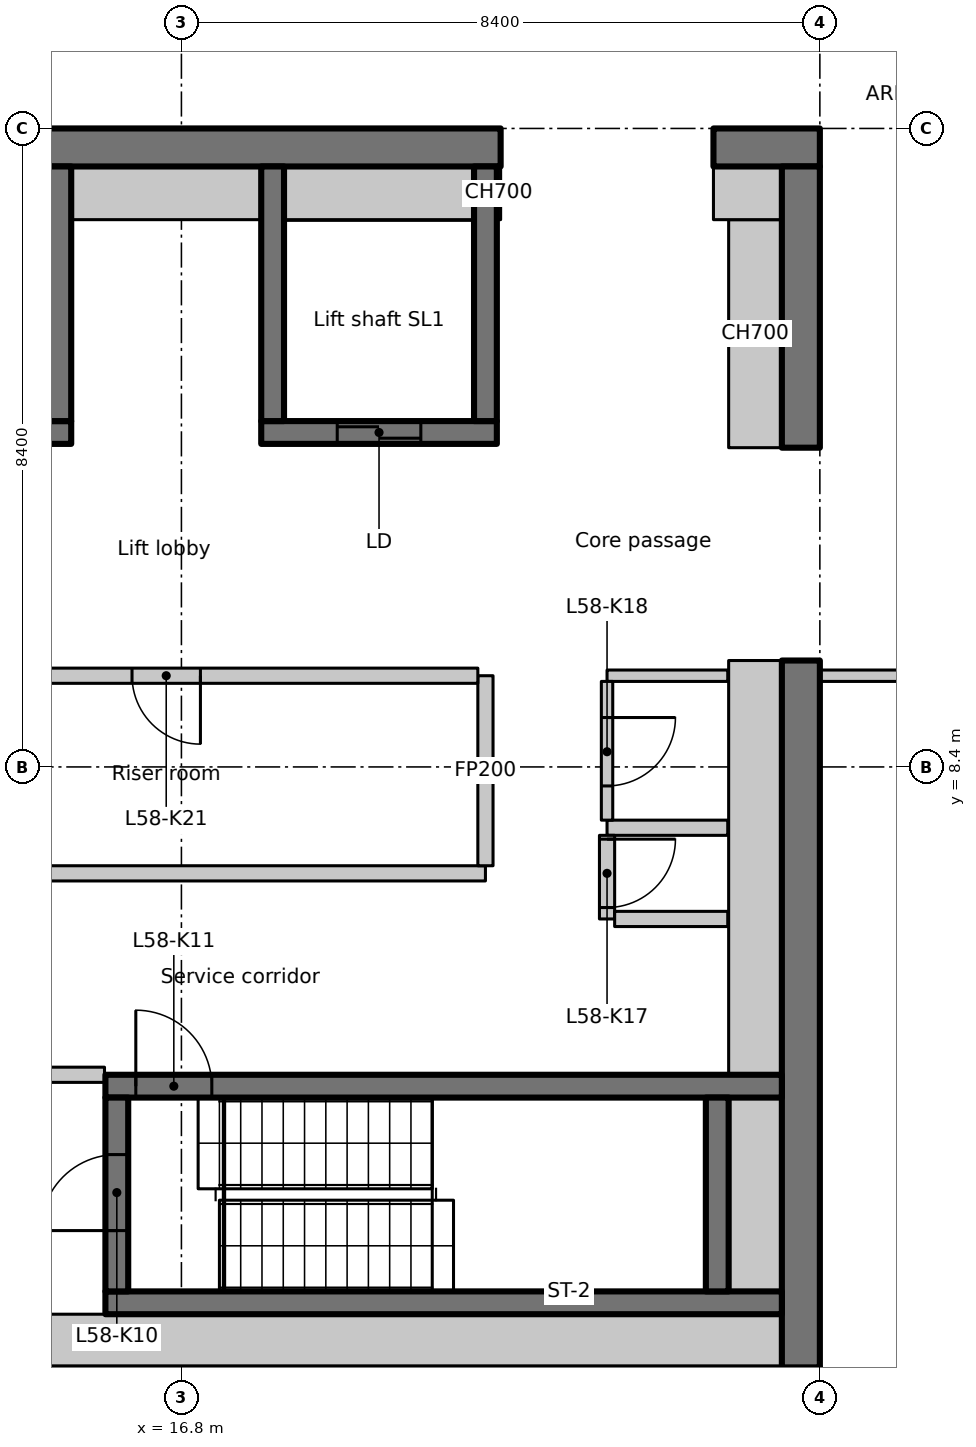
"""IFC4 building model, lengths in metres.
Left out: names, types, materials, properties, quantities, classifications, styles, units other than length and angle.
Written with IfcOpenShell. Run it as: python <this file> out.ifc"""

import sys

from ifc_helpers import new_model, si_unit, direction, frame, frame_2d, origin, place, context, subcontext, project, spatial, rectangle, extrude, element, fill, save


model = new_model("IFC4")
c1 = context("Model", 3, precision=1e-05, world=origin(), true_north=direction((0.0, 1.0)))
c2 = subcontext(c1, "Body", "Model", "MODEL_VIEW")
j1 = project(units=[si_unit("LENGTHUNIT", "METRE"), si_unit("PLANEANGLEUNIT", "RADIAN")], contexts=[c1])
p1 = place(None, origin())
s1 = spatial("IfcSite", under=j1, at=p1, CompositionType="ELEMENT")
p2 = place(p1, origin())
s2 = spatial("IfcBuilding", under=s1, at=p2, CompositionType="ELEMENT")
p3 = place(p2, frame((0.0, 0.0, 230.1)))
s3 = spatial("IfcBuildingStorey", under=s2, at=p3, CompositionType="ELEMENT", Elevation=230.1)
p4 = place(p3, frame((-1.1, 16.55, 0.0), z_axis=(0.0, 0.0, 1.0), x_axis=(1.0, 0.0, 0.0)))
e1 = element("IfcWall", 1, at=p4, inside=s3, PredefinedType="SHEAR", context=c2, shape_type="SweptSolid", body=[
    extrude(rectangle(XDim=22.1, YDim=0.5, at=frame_2d((11.05, 0.0))), origin(), (0.0, 0.0, 1.0), 3.35),
])
p5 = place(p4, frame((3.15, 0.0, 0.0)))
e2 = element("IfcOpeningElement", 2, at=p5, cuts=e1, PredefinedType="OPENING", context=c2, shape_type="SweptSolid", body=[
    extrude(rectangle(XDim=1.1, YDim=2.3, at=frame_2d((0.55, 1.15))), frame((0.0, 0.26, 0.0), z_axis=(0.0, -1.0, 0.0), x_axis=(1.0, 0.0, 0.0)), (0.0, 0.0, 1.0), 0.52),
])
p6 = place(p3, frame((23.8, 16.55, 0.0), z_axis=(0.0, 0.0, 1.0), x_axis=(1.0, 0.0, 0.0)))
e3 = element("IfcWall", 3, at=p6, inside=s3, PredefinedType="SHEAR", context=c2, shape_type="SweptSolid", body=[
    extrude(rectangle(XDim=1.4, YDim=0.5, at=frame_2d((0.7, 0.0))), origin(), (0.0, 0.0, 1.0), 3.35),
])
p7 = place(p3, frame((24.95, 0.5, 0.0), z_axis=(0.0, 0.0, 1.0), x_axis=(0.0, 1.0, 0.0)))
e4 = element("IfcWall", 4, at=p7, inside=s3, PredefinedType="SHEAR", context=c2, shape_type="SweptSolid", body=[
    extrude(rectangle(XDim=9.3, YDim=0.5, at=frame_2d((4.65, 0.0))), origin(), (0.0, 0.0, 1.0), 3.35),
])
p8 = place(p3, frame((24.95, 12.6, 0.0), z_axis=(0.0, 0.0, 1.0), x_axis=(0.0, 1.0, 0.0)))
e5 = element("IfcWall", 5, at=p8, inside=s3, PredefinedType="SHEAR", context=c2, shape_type="SweptSolid", body=[
    extrude(rectangle(XDim=3.7, YDim=0.5, at=frame_2d((1.85, 0.0))), origin(), (0.0, 0.0, 1.0), 3.35),
])
p9 = place(p3, frame((24.35, 12.6, 0.0), z_axis=(0.0, 0.0, 1.0), x_axis=(0.0, 1.0, 0.0)))
e6 = element("IfcWall", 6, at=p9, inside=s3, PredefinedType="PARTITIONING", context=c2, shape_type="SweptSolid", body=[
    extrude(rectangle(XDim=3.0, YDim=0.7, at=frame_2d((1.5, 0.0))), origin(), (0.0, 0.0, 1.0), 3.35),
])
p10 = place(p3, frame((23.8, 15.95, 0.0), z_axis=(0.0, 0.0, 1.0), x_axis=(1.0, 0.0, 0.0)))
e7 = element("IfcWall", 7, at=p10, inside=s3, PredefinedType="PARTITIONING", context=c2, shape_type="SweptSolid", body=[
    extrude(rectangle(XDim=0.9, YDim=0.7, at=frame_2d((0.45, 0.0))), origin(), (0.0, 0.0, 1.0), 3.35),
])
p11 = place(p3, frame((0.5, 12.8, 0.0), z_axis=(0.0, 0.0, 1.0), x_axis=(1.0, 0.0, 0.0)))
e8 = element("IfcWall", 8, at=p11, inside=s3, PredefinedType="SHEAR", context=c2, shape_type="SweptSolid", body=[
    extrude(rectangle(XDim=14.85, YDim=0.3, at=frame_2d((7.425, 0.0))), origin(), (0.0, 0.0, 1.0), 3.35),
])
p12 = place(p11, frame((4.35, 0.0, 0.0)))
e9 = element("IfcOpeningElement", 9, at=p12, cuts=e8, PredefinedType="OPENING", context=c2, shape_type="SweptSolid", body=[
    extrude(rectangle(XDim=1.1, YDim=2.3, at=frame_2d((0.55, 1.15))), frame((0.0, 0.16, 0.0), z_axis=(0.0, -1.0, 0.0), x_axis=(1.0, 0.0, 0.0)), (0.0, 0.0, 1.0), 0.32),
])
p13 = place(p11, frame((7.15, 0.0, 0.0)))
e10 = element("IfcOpeningElement", 10, at=p13, cuts=e8, PredefinedType="OPENING", context=c2, shape_type="SweptSolid", body=[
    extrude(rectangle(XDim=1.1, YDim=2.3, at=frame_2d((0.55, 1.15))), frame((0.0, 0.16, 0.0), z_axis=(0.0, -1.0, 0.0), x_axis=(1.0, 0.0, 0.0)), (0.0, 0.0, 1.0), 0.32),
])
p14 = place(p11, frame((9.95, 0.0, 0.0)))
e11 = element("IfcOpeningElement", 11, at=p14, cuts=e8, PredefinedType="OPENING", context=c2, shape_type="SweptSolid", body=[
    extrude(rectangle(XDim=1.1, YDim=2.3, at=frame_2d((0.55, 1.15))), frame((0.0, 0.16, 0.0), z_axis=(0.0, -1.0, 0.0), x_axis=(1.0, 0.0, 0.0)), (0.0, 0.0, 1.0), 0.32),
])
p15 = place(p11, frame((12.75, 0.0, 0.0)))
e12 = element("IfcOpeningElement", 12, at=p15, cuts=e8, PredefinedType="OPENING", context=c2, shape_type="SweptSolid", body=[
    extrude(rectangle(XDim=1.1, YDim=2.3, at=frame_2d((0.55, 1.15))), frame((0.0, 0.16, 0.0), z_axis=(0.0, -1.0, 0.0), x_axis=(1.0, 0.0, 0.0)), (0.0, 0.0, 1.0), 0.32),
])
p16 = place(p3, frame((15.2, 12.95, 0.0), z_axis=(0.0, 0.0, 1.0), x_axis=(0.0, 1.0, 0.0)))
e13 = element("IfcWall", 13, at=p16, inside=s3, PredefinedType="SHEAR", context=c2, shape_type="SweptSolid", body=[
    extrude(rectangle(XDim=3.35, YDim=0.3, at=frame_2d((1.675, 0.0))), origin(), (0.0, 0.0, 1.0), 3.35),
])
p17 = place(p3, frame((17.85, 12.8, 0.0), z_axis=(0.0, 0.0, 1.0), x_axis=(1.0, 0.0, 0.0)))
e14 = element("IfcWall", 14, at=p17, inside=s3, PredefinedType="SHEAR", context=c2, shape_type="SweptSolid", body=[
    extrude(rectangle(XDim=3.1, YDim=0.3, at=frame_2d((1.55, 0.0))), origin(), (0.0, 0.0, 1.0), 3.35),
])
p18 = place(p17, frame((1.0, 0.0, 0.0)))
e15 = element("IfcOpeningElement", 15, at=p18, cuts=e14, PredefinedType="OPENING", context=c2, shape_type="SweptSolid", body=[
    extrude(rectangle(XDim=1.1, YDim=2.3, at=frame_2d((0.55, 1.15))), frame((0.0, 0.16, 0.0), z_axis=(0.0, -1.0, 0.0), x_axis=(1.0, 0.0, 0.0)), (0.0, 0.0, 1.0), 0.32),
])
for number, where, z_axis, x_axis in (
    (16, (18.0, 12.95, 0.0), (0.0, 0.0, 1.0), (0.0, 1.0, 0.0)),
    (17, (20.8, 12.95, 0.0), (0.0, 0.0, 1.0), (0.0, 1.0, 0.0)),
):
    element("IfcWall", number, at=place(p3, frame(where, z_axis=z_axis, x_axis=x_axis)), inside=s3, PredefinedType="SHEAR", context=c2, shape_type="SweptSolid", body=[
        extrude(rectangle(XDim=3.35, YDim=0.3, at=frame_2d((1.675, 0.0))), origin(), (0.0, 0.0, 1.0), 3.35),
    ])
p19 = place(p3, frame((15.8, 1.35, 0.0), z_axis=(0.0, 0.0, 1.0), x_axis=(1.0, 0.0, 0.0)))
e18 = element("IfcWall", 18, at=p19, inside=s3, PredefinedType="SHEAR", context=c2, shape_type="SweptSolid", body=[
    extrude(rectangle(XDim=8.9, YDim=0.3, at=frame_2d((4.45, 0.0))), origin(), (0.0, 0.0, 1.0), 3.35),
])
p20 = place(p3, frame((15.8, 4.2, 0.0), z_axis=(0.0, 0.0, 1.0), x_axis=(1.0, 0.0, 0.0)))
e19 = element("IfcWall", 19, at=p20, inside=s3, PredefinedType="SHEAR", context=c2, shape_type="SweptSolid", body=[
    extrude(rectangle(XDim=8.9, YDim=0.3, at=frame_2d((4.45, 0.0))), origin(), (0.0, 0.0, 1.0), 3.35),
])
p21 = place(p20, frame((0.4, 0.0, 0.0)))
e20 = element("IfcOpeningElement", 20, at=p21, cuts=e19, PredefinedType="OPENING", context=c2, shape_type="SweptSolid", body=[
    extrude(rectangle(XDim=1.0, YDim=2.1, at=frame_2d((0.5, 1.05))), frame((0.0, 0.16, 0.0), z_axis=(0.0, -1.0, 0.0), x_axis=(1.0, 0.0, 0.0)), (0.0, 0.0, 1.0), 0.32),
])
p22 = place(p3, frame((15.95, 1.5, 0.0), z_axis=(0.0, 0.0, 1.0), x_axis=(0.0, 1.0, 0.0)))
e21 = element("IfcWall", 21, at=p22, inside=s3, PredefinedType="SHEAR", context=c2, shape_type="SweptSolid", body=[
    extrude(rectangle(XDim=2.55, YDim=0.3, at=frame_2d((1.275, 0.0))), origin(), (0.0, 0.0, 1.0), 3.35),
])
p23 = place(p22, frame((0.8, 0.0, 0.0)))
e22 = element("IfcOpeningElement", 22, at=p23, cuts=e21, PredefinedType="OPENING", context=c2, shape_type="SweptSolid", body=[
    extrude(rectangle(XDim=1.0, YDim=2.1, at=frame_2d((0.5, 1.05))), frame((0.0, 0.16, 0.0), z_axis=(0.0, -1.0, 0.0), x_axis=(1.0, 0.0, 0.0)), (0.0, 0.0, 1.0), 0.32),
])
p24 = place(p3, frame((23.85, 1.5, 0.0), z_axis=(0.0, 0.0, 1.0), x_axis=(0.0, 1.0, 0.0)))
e23 = element("IfcWall", 23, at=p24, inside=s3, PredefinedType="SHEAR", context=c2, shape_type="SweptSolid", body=[
    extrude(rectangle(XDim=2.55, YDim=0.3, at=frame_2d((1.275, 0.0))), origin(), (0.0, 0.0, 1.0), 3.35),
])
p25 = place(p3, frame((13.362, 4.35, 0.0), z_axis=(0.0, 0.0, 1.0), x_axis=(1.0, 0.0, 0.0)))
e24 = element("IfcWall", 24, at=p25, inside=s3, PredefinedType="PARTITIONING", context=c2, shape_type="SweptSolid", body=[
    extrude(rectangle(XDim=2.426, YDim=0.2, at=frame_2d((1.213, 0.0))), origin(), (0.0, 0.0, 1.0), 3.35),
])
p26 = place(p25, frame((0.638, 0.0, 0.0)))
e25 = element("IfcOpeningElement", 25, at=p26, cuts=e24, PredefinedType="OPENING", context=c2, shape_type="SweptSolid", body=[
    extrude(rectangle(XDim=1.0, YDim=2.1, at=frame_2d((0.5, 1.05))), frame((0.0, 0.11, 0.0), z_axis=(0.0, -1.0, 0.0), x_axis=(1.0, 0.0, 0.0)), (0.0, 0.0, 1.0), 0.22),
])
p27 = place(p3, frame((12.4, 7.0, 0.0), z_axis=(0.0, 0.0, 1.0), x_axis=(1.0, 0.0, 0.0)))
e26 = element("IfcWall", 26, at=p27, inside=s3, PredefinedType="PARTITIONING", context=c2, shape_type="SweptSolid", body=[
    extrude(rectangle(XDim=8.4, YDim=0.2, at=frame_2d((4.2, 0.0))), origin(), (0.0, 0.0, 1.0), 3.35),
])
p28 = place(p3, frame((20.8, 7.1, 0.0), z_axis=(0.0, 0.0, 1.0), x_axis=(0.0, 1.0, 0.0)))
e27 = element("IfcWall", 27, at=p28, inside=s3, PredefinedType="PARTITIONING", context=c2, shape_type="SweptSolid", body=[
    extrude(rectangle(XDim=2.5, YDim=0.2, at=frame_2d((1.25, 0.0))), origin(), (0.0, 0.0, 1.0), 3.35),
])
p29 = place(p3, frame((20.7, 9.6, 0.0), z_axis=(0.0, 0.0, 1.0), x_axis=(-1.0, 0.0, 0.0)))
e28 = element("IfcWall", 28, at=p29, inside=s3, PredefinedType="PARTITIONING", context=c2, shape_type="SweptSolid", body=[
    extrude(rectangle(XDim=8.3, YDim=0.2, at=frame_2d((4.15, 0.0))), origin(), (0.0, 0.0, 1.0), 3.35),
])
p30 = place(p29, frame((3.65, 0.0, 0.0)))
e29 = element("IfcOpeningElement", 29, at=p30, cuts=e28, PredefinedType="OPENING", context=c2, shape_type="SweptSolid", body=[
    extrude(rectangle(XDim=0.9, YDim=2.1, at=frame_2d((0.45, 1.05))), frame((0.0, 0.11, 0.0), z_axis=(0.0, -1.0, 0.0), x_axis=(1.0, 0.0, 0.0)), (0.0, 0.0, 1.0), 0.22),
])
p31 = place(p3, frame((23.988, 7.6, 0.0), z_axis=(0.0, 0.0, 1.0), x_axis=(-1.0, 0.0, 0.0)))
e30 = element("IfcWall", 30, at=p31, inside=s3, PredefinedType="PARTITIONING", context=c2, shape_type="SweptSolid", body=[
    extrude(rectangle(XDim=1.588, YDim=0.2, at=frame_2d((0.794, 0.0))), origin(), (0.0, 0.0, 1.0), 3.35),
])
p32 = place(p3, frame((22.4, 7.5, 0.0), z_axis=(0.0, 0.0, 1.0), x_axis=(0.0, -1.0, 0.0)))
e31 = element("IfcWall", 31, at=p32, inside=s3, PredefinedType="PARTITIONING", context=c2, shape_type="SweptSolid", body=[
    extrude(rectangle(XDim=1.1, YDim=0.2, at=frame_2d((0.55, 0.0))), origin(), (0.0, 0.0, 1.0), 3.35),
])
p33 = place(p32, frame((0.05, 0.0, 0.0)))
e32 = element("IfcOpeningElement", 32, at=p33, cuts=e31, PredefinedType="OPENING", context=c2, shape_type="SweptSolid", body=[
    extrude(rectangle(XDim=0.9, YDim=2.1, at=frame_2d((0.45, 1.05))), frame((0.0, 0.11, 0.0), z_axis=(0.0, -1.0, 0.0), x_axis=(1.0, 0.0, 0.0)), (0.0, 0.0, 1.0), 0.22),
])
p34 = place(p3, frame((22.5, 6.4, 0.0), z_axis=(0.0, 0.0, 1.0), x_axis=(1.0, 0.0, 0.0)))
e33 = element("IfcWall", 33, at=p34, inside=s3, PredefinedType="PARTITIONING", context=c2, shape_type="SweptSolid", body=[
    extrude(rectangle(XDim=1.488, YDim=0.2, at=frame_2d((0.744, 0.0))), origin(), (0.0, 0.0, 1.0), 3.35),
])
p35 = place(p3, frame((23.988, 9.6, 0.0), z_axis=(0.0, 0.0, 1.0), x_axis=(-1.0, 0.0, 0.0)))
e34 = element("IfcWall", 34, at=p35, inside=s3, PredefinedType="PARTITIONING", context=c2, shape_type="SweptSolid", body=[
    extrude(rectangle(XDim=1.588, YDim=0.15, at=frame_2d((0.794, 0.0))), origin(), (0.0, 0.0, 1.0), 3.35),
])
p36 = place(p3, frame((22.4, 9.525, 0.0), z_axis=(0.0, 0.0, 1.0), x_axis=(0.0, -1.0, 0.0)))
e35 = element("IfcWall", 35, at=p36, inside=s3, PredefinedType="PARTITIONING", context=c2, shape_type="SweptSolid", body=[
    extrude(rectangle(XDim=1.825, YDim=0.15, at=frame_2d((0.913, 0.0))), origin(), (0.0, 0.0, 1.0), 3.35),
])
p37 = place(p36, frame((0.475, 0.0, 0.0)))
e36 = element("IfcOpeningElement", 36, at=p37, cuts=e35, PredefinedType="OPENING", context=c2, shape_type="SweptSolid", body=[
    extrude(rectangle(XDim=0.9, YDim=2.1, at=frame_2d((0.45, 1.05))), frame((0.0, 0.085, 0.0), z_axis=(0.0, -1.0, 0.0), x_axis=(1.0, 0.0, 0.0)), (0.0, 0.0, 1.0), 0.17),
])
for number, where, z_axis, x_axis in (
    (37, (15.35, 15.95, 0.0), (0.0, 0.0, 1.0), (1.0, 0.0, 0.0)),
    (38, (18.15, 15.95, 0.0), (0.0, 0.0, 1.0), (1.0, 0.0, 0.0)),
):
    element("IfcWall", number, at=place(p3, frame(where, z_axis=z_axis, x_axis=x_axis)), inside=s3, PredefinedType="PARTITIONING", context=c2, shape_type="SweptSolid", body=[
        extrude(rectangle(XDim=2.5, YDim=0.7, at=frame_2d((1.25, 0.0))), origin(), (0.0, 0.0, 1.0), 3.35),
    ])
p38 = place(p3, frame((20.95, 15.95, 0.0), z_axis=(0.0, 0.0, 1.0), x_axis=(1.0, 0.0, 0.0)))
e39 = element("IfcWall", 39, at=p38, inside=s3, PredefinedType="PARTITIONING", context=c2, shape_type="SweptSolid", body=[
    extrude(rectangle(XDim=0.05, YDim=0.7, at=frame_2d((0.025, 0.0))), origin(), (0.0, 0.0, 1.0), 3.35),
])
p39 = place(p3, frame((13.35, 0.85, 0.0), z_axis=(0.0, 0.0, 1.0), x_axis=(1.0, 0.0, 0.0)))
e40 = element("IfcWall", 40, at=p39, inside=s3, PredefinedType="PARTITIONING", context=c2, shape_type="SweptSolid", body=[
    extrude(rectangle(XDim=11.35, YDim=0.7, at=frame_2d((5.675, 0.0))), origin(), (0.0, 0.0, 1.0), 3.35),
])
p40 = place(p3, frame((24.35, 1.5, 0.0), z_axis=(0.0, 0.0, 1.0), x_axis=(0.0, 1.0, 0.0)))
e41 = element("IfcWall", 41, at=p40, inside=s3, PredefinedType="PARTITIONING", context=c2, shape_type="SweptSolid", body=[
    extrude(rectangle(XDim=2.55, YDim=0.7, at=frame_2d((1.275, 0.0))), origin(), (0.0, 0.0, 1.0), 3.35),
])
p41 = place(p3, frame((24.35, 4.35, 0.0), z_axis=(0.0, 0.0, 1.0), x_axis=(0.0, 1.0, 0.0)))
e42 = element("IfcWall", 42, at=p41, inside=s3, PredefinedType="PARTITIONING", context=c2, shape_type="SweptSolid", body=[
    extrude(rectangle(XDim=5.45, YDim=0.7, at=frame_2d((2.725, 0.0))), origin(), (0.0, 0.0, 1.0), 3.35),
])
p42 = place(p3, frame((29.4, 9.6, 0.0), z_axis=(0.0, 0.0, 1.0), x_axis=(-1.0, 0.0, 0.0)))
e43 = element("IfcWall", 43, at=p42, inside=s3, PredefinedType="PARTITIONING", context=c2, shape_type="SweptSolid", body=[
    extrude(rectangle(XDim=4.2, YDim=0.15, at=frame_2d((2.1, 0.0))), origin(), (0.0, 0.0, 1.0), 3.33),
])
p43 = place(p18, origin())
e44 = element("IfcDoor", 44, at=p43, inside=s3, OperationType="SLIDING_TO_LEFT", PredefinedType="DOOR", context=c2, shape_type="SweptSolid", body=[
    extrude(rectangle(XDim=1.1, YDim=2.3, at=frame_2d((0.55, 1.15))), frame((0.0, 0.025, 0.0), z_axis=(0.0, -1.0, 0.0), x_axis=(1.0, 0.0, 0.0)), (0.0, 0.0, 1.0), 0.05),
])
fill(e15, e44)
p44 = place(p23, origin())
e45 = element("IfcDoor", 45, at=p44, inside=s3, OperationType="SINGLE_SWING_LEFT", PredefinedType="DOOR", context=c2, shape_type="SweptSolid", body=[
    extrude(rectangle(XDim=1.0, YDim=2.1, at=frame_2d((0.5, 1.05))), frame((0.0, 0.025, 0.0), z_axis=(0.0, -1.0, 0.0), x_axis=(1.0, 0.0, 0.0)), (0.0, 0.0, 1.0), 0.05),
])
fill(e22, e45)
p45 = place(p21, origin())
e46 = element("IfcDoor", 46, at=p45, inside=s3, OperationType="SINGLE_SWING_RIGHT", PredefinedType="DOOR", context=c2, shape_type="SweptSolid", body=[
    extrude(rectangle(XDim=1.0, YDim=2.1, at=frame_2d((0.5, 1.05))), frame((0.0, 0.025, 0.0), z_axis=(0.0, -1.0, 0.0), x_axis=(1.0, 0.0, 0.0)), (0.0, 0.0, 1.0), 0.05),
])
fill(e20, e46)
p46 = place(p33, origin())
e47 = element("IfcDoor", 47, at=p46, inside=s3, OperationType="SINGLE_SWING_RIGHT", PredefinedType="DOOR", context=c2, shape_type="SweptSolid", body=[
    extrude(rectangle(XDim=0.9, YDim=2.1, at=frame_2d((0.45, 1.05))), frame((0.0, 0.025, 0.0), z_axis=(0.0, -1.0, 0.0), x_axis=(1.0, 0.0, 0.0)), (0.0, 0.0, 1.0), 0.05),
])
fill(e32, e47)
p47 = place(p37, origin())
e48 = element("IfcDoor", 48, at=p47, inside=s3, OperationType="SINGLE_SWING_LEFT", PredefinedType="DOOR", context=c2, shape_type="SweptSolid", body=[
    extrude(rectangle(XDim=0.9, YDim=2.1, at=frame_2d((0.45, 1.05))), frame((0.0, 0.025, 0.0), z_axis=(0.0, -1.0, 0.0), x_axis=(1.0, 0.0, 0.0)), (0.0, 0.0, 1.0), 0.05),
])
fill(e36, e48)
p48 = place(p30, origin())
e49 = element("IfcDoor", 49, at=p48, inside=s3, OperationType="SINGLE_SWING_RIGHT", PredefinedType="DOOR", context=c2, shape_type="SweptSolid", body=[
    extrude(rectangle(XDim=0.9, YDim=2.1, at=frame_2d((0.45, 1.05))), frame((0.0, 0.025, 0.0), z_axis=(0.0, -1.0, 0.0), x_axis=(1.0, 0.0, 0.0)), (0.0, 0.0, 1.0), 0.05),
])
fill(e29, e49)
save(model, sys.argv[1])
